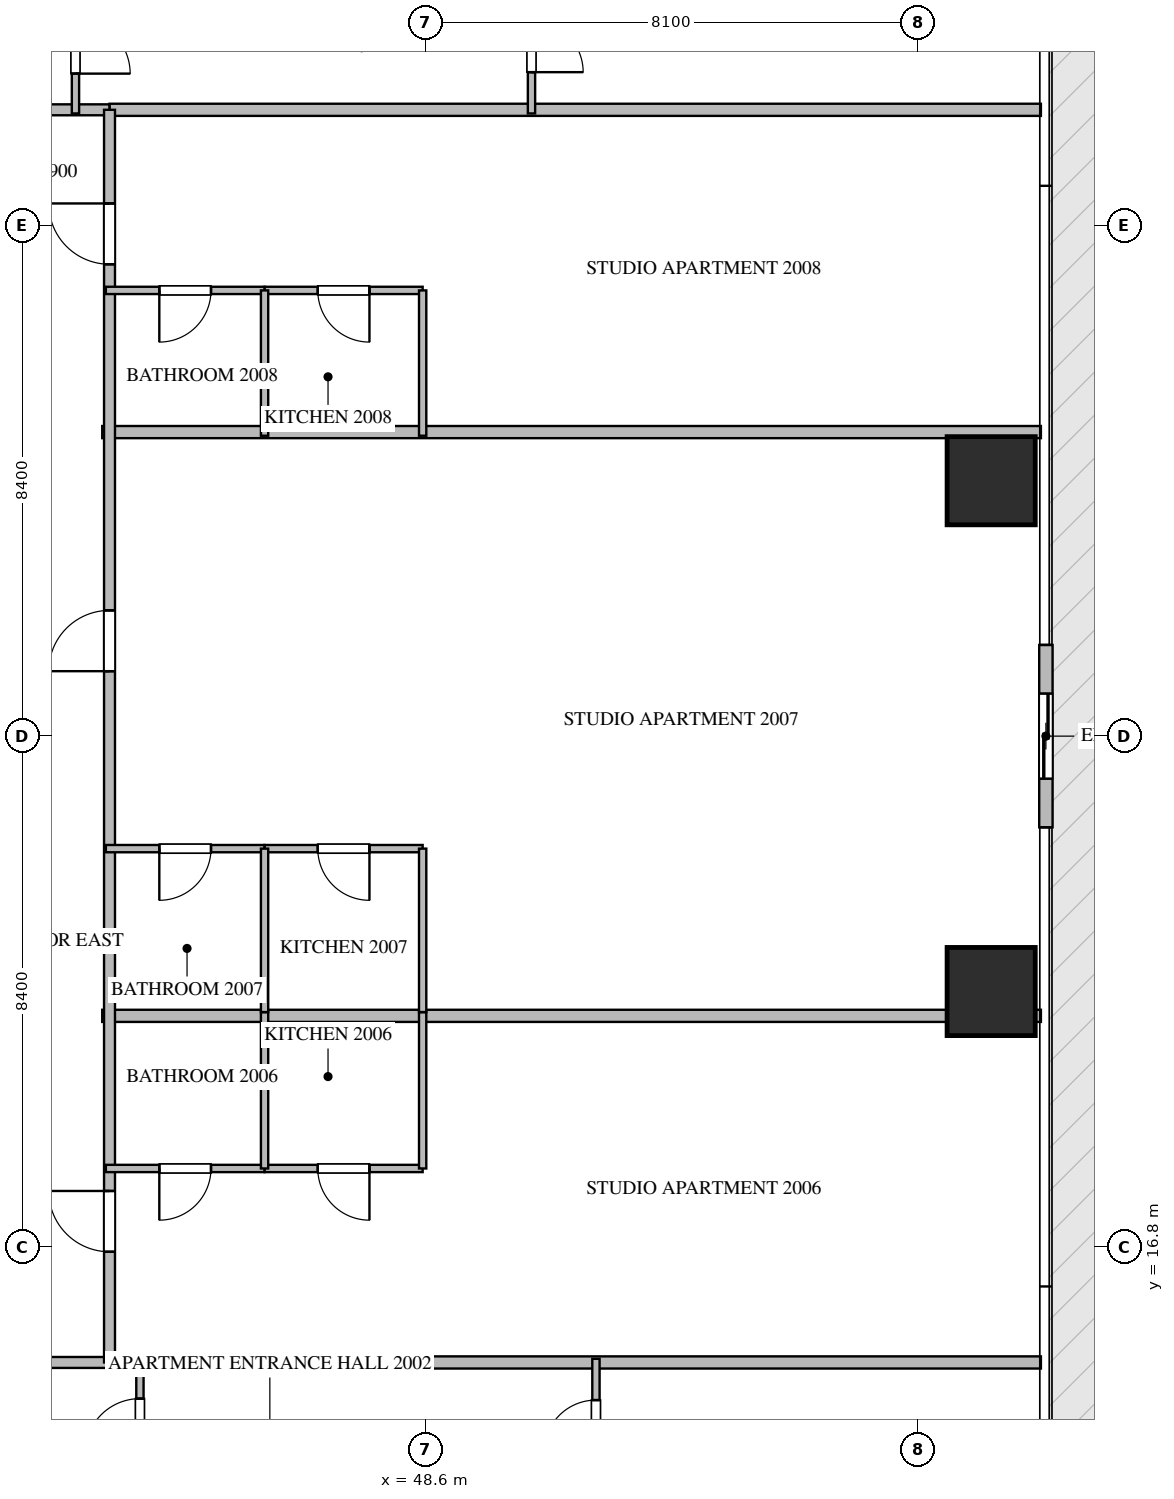
"""IFC4 building model, lengths in metres.
Left out: names, types, materials, properties, quantities, classifications, styles, units other than length and angle.
Written with IfcOpenShell. Run it as: python <this file> out.ifc"""

import sys

from ifc_helpers import new_model, si_unit, direction, frame, frame_2d, origin, origin_2d, place, context, subcontext, project, spatial, rectangle, extrude, source, transform, mapped, element, fill, save


model = new_model("IFC4")
c1 = context("Model", 3, precision=1e-05, world=origin(), true_north=direction((0.0, 1.0)))
c2 = subcontext(c1, "Body", "Model", "MODEL_VIEW")
j1 = project(units=[si_unit("LENGTHUNIT", "METRE"), si_unit("PLANEANGLEUNIT", "RADIAN")], contexts=[c1])
p1 = place(None, origin())
s1 = spatial("IfcSite", under=j1, at=p1, CompositionType="ELEMENT")
p2 = place(p1, origin())
s2 = spatial("IfcBuilding", under=s1, at=p2, CompositionType="ELEMENT")
p3 = place(p2, frame((0.0, 0.0, 82.95)))
s3 = spatial("IfcBuildingStorey", under=s2, at=p3, CompositionType="ELEMENT", Elevation=82.95)
m1 = source(origin(), c2, "Body", "SweptSolid", [
    extrude(rectangle(XDim=1.45, YDim=1.45, at=origin_2d()), origin(), (0.0, 0.0, 1.0), 3.75),
])
for number, where, z_axis, x_axis in (
    (1, (57.9, 21.0, -0.26), (0.0, 0.0, 1.0), (1.0, 0.0, 0.0)),
    (2, (57.9, 29.4, -0.26), (0.0, 0.0, 1.0), (1.0, 0.0, 0.0)),
):
    element("IfcColumn", number, at=place(p3, frame(where, z_axis=z_axis, x_axis=x_axis)), inside=s3, PredefinedType="COLUMN", context=c2, shape_type="MappedRepresentation", body=[
        mapped(m1, transform((0.0, 0.0, 0.0), scale=1.0)),
    ])
p4 = place(p3, frame((58.8, 23.7, 0.0), z_axis=(0.0, 0.0, 1.0), x_axis=(0.0, 1.0, 0.0)))
e3 = element("IfcWall", 3, at=p4, inside=s3, PredefinedType="ELEMENTEDWALL", context=c2, shape_type="SweptSolid", body=[
    extrude(rectangle(XDim=3.0, YDim=0.22, at=frame_2d((1.5, 0.0))), origin(), (0.0, 0.0, 1.0), 3.475),
])
p5 = place(p4, frame((0.8, 0.0, 0.0)))
e4 = element("IfcOpeningElement", 4, at=p5, cuts=e3, PredefinedType="OPENING", context=c2, shape_type="SweptSolid", body=[
    extrude(rectangle(XDim=1.4, YDim=2.25, at=frame_2d((0.7, 1.125))), frame((0.0, 0.12, 0.0), z_axis=(0.0, -1.0, 0.0), x_axis=(1.0, 0.0, 0.0)), (0.0, 0.0, 1.0), 0.24),
])
for number, where, z_axis, x_axis in (
    (5, (43.28, 20.6, 0.0), (0.0, 0.0, 1.0), (1.0, 0.0, 0.0)),
    (6, (43.28, 30.2, 0.0), (0.0, 0.0, 1.0), (1.0, 0.0, 0.0)),
):
    element("IfcWall", number, at=place(p3, frame(where, z_axis=z_axis, x_axis=x_axis)), inside=s3, PredefinedType="PARTITIONING", context=c2, shape_type="SweptSolid", body=[
        extrude(rectangle(XDim=15.438, YDim=0.2, at=frame_2d((7.719, 0.0))), origin(), (0.0, 0.0, 1.0), 3.49),
    ])
for number, where, z_axis, x_axis in (
    (7, (43.4, 14.9, 0.0), (0.0, 0.0, 1.0), (1.0, 0.0, 0.0)),
    (8, (43.4, 35.5, 0.0), (0.0, 0.0, 1.0), (1.0, 0.0, 0.0)),
):
    element("IfcWall", number, at=place(p3, frame(where, z_axis=z_axis, x_axis=x_axis)), inside=s3, PredefinedType="PARTITIONING", context=c2, shape_type="SweptSolid", body=[
        extrude(rectangle(XDim=15.318, YDim=0.2, at=frame_2d((7.659, 0.0))), origin(), (0.0, 0.0, 1.0), 3.49),
    ])
p6 = place(p3, frame((21.402, 14.9, 0.0), z_axis=(0.0, 0.0, 1.0), x_axis=(1.0, 0.0, 0.0)))
e9 = element("IfcWall", 9, at=p6, inside=s3, PredefinedType="PARTITIONING", context=c2, shape_type="SweptSolid", body=[
    extrude(rectangle(XDim=21.996, YDim=0.18, at=frame_2d((10.998, 0.0))), origin(), (0.0, 0.0, 1.0), 3.49),
])
p7 = place(p6, frame((5.774, 0.0, 0.0)))
e10 = element("IfcOpeningElement", 10, at=p7, cuts=e9, PredefinedType="OPENING", context=c2, shape_type="SweptSolid", body=[
    extrude(rectangle(XDim=1.0, YDim=2.15, at=frame_2d((0.5, 1.075))), frame((0.0, 0.1, 0.0), z_axis=(0.0, -1.0, 0.0), x_axis=(1.0, 0.0, 0.0)), (0.0, 0.0, 1.0), 0.2),
])
p8 = place(p6, frame((16.272, 0.0, 0.0)))
e11 = element("IfcOpeningElement", 11, at=p8, cuts=e9, PredefinedType="OPENING", context=c2, shape_type="SweptSolid", body=[
    extrude(rectangle(XDim=1.0, YDim=2.15, at=frame_2d((0.5, 1.075))), frame((0.0, 0.1, 0.0), z_axis=(0.0, -1.0, 0.0), x_axis=(1.0, 0.0, 0.0)), (0.0, 0.0, 1.0), 0.2),
])
p9 = place(p3, frame((21.402, 35.5, 0.0), z_axis=(0.0, 0.0, 1.0), x_axis=(1.0, 0.0, 0.0)))
e12 = element("IfcWall", 12, at=p9, inside=s3, PredefinedType="PARTITIONING", context=c2, shape_type="SweptSolid", body=[
    extrude(rectangle(XDim=21.996, YDim=0.18, at=frame_2d((10.998, 0.0))), origin(), (0.0, 0.0, 1.0), 3.49),
])
p10 = place(p9, frame((4.724, 0.0, 0.0)))
e13 = element("IfcOpeningElement", 13, at=p10, cuts=e12, PredefinedType="OPENING", context=c2, shape_type="SweptSolid", body=[
    extrude(rectangle(XDim=1.0, YDim=2.15, at=frame_2d((0.5, 1.075))), frame((0.0, 0.1, 0.0), z_axis=(0.0, -1.0, 0.0), x_axis=(1.0, 0.0, 0.0)), (0.0, 0.0, 1.0), 0.2),
])
p11 = place(p9, frame((18.77, 0.0, 0.0)))
e14 = element("IfcOpeningElement", 14, at=p11, cuts=e12, PredefinedType="OPENING", context=c2, shape_type="SweptSolid", body=[
    extrude(rectangle(XDim=1.0, YDim=2.15, at=frame_2d((0.5, 1.075))), frame((0.0, 0.1, 0.0), z_axis=(0.0, -1.0, 0.0), x_axis=(1.0, 0.0, 0.0)), (0.0, 0.0, 1.0), 0.2),
])
p12 = place(p3, frame((43.4, 14.9, 0.0), z_axis=(0.0, 0.0, 1.0), x_axis=(0.0, 1.0, 0.0)))
e15 = element("IfcWall", 15, at=p12, inside=s3, PredefinedType="PARTITIONING", context=c2, shape_type="SweptSolid", body=[
    extrude(rectangle(XDim=20.6, YDim=0.18, at=frame_2d((10.3, 0.0))), origin(), (0.0, 0.0, 1.0), 3.49),
])
p13 = place(p12, frame((1.82, 0.0, 0.0)))
e16 = element("IfcOpeningElement", 16, at=p13, cuts=e15, PredefinedType="OPENING", context=c2, shape_type="SweptSolid", body=[
    extrude(rectangle(XDim=1.0, YDim=2.15, at=frame_2d((0.5, 1.075))), frame((0.0, 0.1, 0.0), z_axis=(0.0, -1.0, 0.0), x_axis=(1.0, 0.0, 0.0)), (0.0, 0.0, 1.0), 0.2),
])
p14 = place(p12, frame((11.368, 0.0, 0.0)))
e17 = element("IfcOpeningElement", 17, at=p14, cuts=e15, PredefinedType="OPENING", context=c2, shape_type="SweptSolid", body=[
    extrude(rectangle(XDim=1.0, YDim=2.15, at=frame_2d((0.5, 1.075))), frame((0.0, 0.1, 0.0), z_axis=(0.0, -1.0, 0.0), x_axis=(1.0, 0.0, 0.0)), (0.0, 0.0, 1.0), 0.2),
])
p15 = place(p12, frame((18.06, 0.0, 0.0)))
e18 = element("IfcOpeningElement", 18, at=p15, cuts=e15, PredefinedType="OPENING", context=c2, shape_type="SweptSolid", body=[
    extrude(rectangle(XDim=1.0, YDim=2.15, at=frame_2d((0.5, 1.075))), frame((0.0, 0.1, 0.0), z_axis=(0.0, -1.0, 0.0), x_axis=(1.0, 0.0, 0.0)), (0.0, 0.0, 1.0), 0.2),
])
p16 = place(p3, frame((43.9, 12.75, 0.0), z_axis=(0.0, 0.0, 1.0), x_axis=(0.0, 1.0, 0.0)))
e19 = element("IfcWall", 19, at=p16, inside=s3, PredefinedType="PARTITIONING", context=c2, shape_type="SweptSolid", body=[
    extrude(rectangle(XDim=2.21, YDim=0.12, at=frame_2d((1.105, 0.0))), origin(), (0.0, 0.0, 1.0), 3.49),
])
p17 = place(p16, frame((0.655, 0.0, 0.0)))
e20 = element("IfcOpeningElement", 20, at=p17, cuts=e19, PredefinedType="OPENING", context=c2, shape_type="SweptSolid", body=[
    extrude(rectangle(XDim=0.9, YDim=2.1, at=frame_2d((0.45, 1.05))), frame((0.0, 0.07, 0.0), z_axis=(0.0, -1.0, 0.0), x_axis=(1.0, 0.0, 0.0)), (0.0, 0.0, 1.0), 0.14),
])
p18 = place(p3, frame((51.4, 12.752, 0.0), z_axis=(0.0, 0.0, 1.0), x_axis=(0.0, 1.0, 0.0)))
e21 = element("IfcWall", 21, at=p18, inside=s3, PredefinedType="PARTITIONING", context=c2, shape_type="SweptSolid", body=[
    extrude(rectangle(XDim=2.208, YDim=0.12, at=frame_2d((1.104, 0.0))), origin(), (0.0, 0.0, 1.0), 3.49),
])
p19 = place(p18, frame((0.679, 0.0, 0.0)))
e22 = element("IfcOpeningElement", 22, at=p19, cuts=e21, PredefinedType="OPENING", context=c2, shape_type="SweptSolid", body=[
    extrude(rectangle(XDim=0.85, YDim=2.1, at=frame_2d((0.425, 1.05))), frame((0.0, 0.07, 0.0), z_axis=(0.0, -1.0, 0.0), x_axis=(1.0, 0.0, 0.0)), (0.0, 0.0, 1.0), 0.14),
])
p20 = place(p3, frame((42.84, 37.65, 0.0), z_axis=(0.0, 0.0, 1.0), x_axis=(0.0, -1.0, 0.0)))
e23 = element("IfcWall", 23, at=p20, inside=s3, PredefinedType="PARTITIONING", context=c2, shape_type="SweptSolid", body=[
    extrude(rectangle(XDim=2.21, YDim=0.12, at=frame_2d((1.105, 0.0))), origin(), (0.0, 0.0, 1.0), 3.49),
])
p21 = place(p20, frame((0.655, 0.0, 0.0)))
e24 = element("IfcOpeningElement", 24, at=p21, cuts=e23, PredefinedType="OPENING", context=c2, shape_type="SweptSolid", body=[
    extrude(rectangle(XDim=0.9, YDim=2.1, at=frame_2d((0.45, 1.05))), frame((0.0, 0.07, 0.0), z_axis=(0.0, -1.0, 0.0), x_axis=(1.0, 0.0, 0.0)), (0.0, 0.0, 1.0), 0.14),
])
p22 = place(p3, frame((50.34, 37.648, 0.0), z_axis=(0.0, 0.0, 1.0), x_axis=(0.0, -1.0, 0.0)))
e25 = element("IfcWall", 25, at=p22, inside=s3, PredefinedType="PARTITIONING", context=c2, shape_type="SweptSolid", body=[
    extrude(rectangle(XDim=2.208, YDim=0.12, at=frame_2d((1.104, 0.0))), origin(), (0.0, 0.0, 1.0), 3.49),
])
p23 = place(p22, frame((0.679, 0.0, 0.0)))
e26 = element("IfcOpeningElement", 26, at=p23, cuts=e25, PredefinedType="OPENING", context=c2, shape_type="SweptSolid", body=[
    extrude(rectangle(XDim=0.85, YDim=2.1, at=frame_2d((0.425, 1.05))), frame((0.0, 0.07, 0.0), z_axis=(0.0, -1.0, 0.0), x_axis=(1.0, 0.0, 0.0)), (0.0, 0.0, 1.0), 0.14),
])
p24 = place(p3, frame((48.55, 18.09, 0.0), z_axis=(0.0, 0.0, 1.0), x_axis=(-1.0, 0.0, 0.0)))
e27 = element("IfcWall", 27, at=p24, inside=s3, PredefinedType="PARTITIONING", context=c2, shape_type="SweptSolid", body=[
    extrude(rectangle(XDim=2.6, YDim=0.12, at=frame_2d((1.3, 0.0))), origin(), (0.0, 0.0, 1.0), 3.49),
])
p25 = place(p24, frame((0.875, 0.0, 0.0)))
e28 = element("IfcOpeningElement", 28, at=p25, cuts=e27, PredefinedType="OPENING", context=c2, shape_type="SweptSolid", body=[
    extrude(rectangle(XDim=0.85, YDim=2.1, at=frame_2d((0.425, 1.05))), frame((0.0, 0.07, 0.0), z_axis=(0.0, -1.0, 0.0), x_axis=(1.0, 0.0, 0.0)), (0.0, 0.0, 1.0), 0.14),
])
p26 = place(p3, frame((45.948, 18.09, 0.0), z_axis=(0.0, 0.0, 1.0), x_axis=(-1.0, 0.0, 0.0)))
e29 = element("IfcWall", 29, at=p26, inside=s3, PredefinedType="PARTITIONING", context=c2, shape_type="SweptSolid", body=[
    extrude(rectangle(XDim=2.608, YDim=0.12, at=frame_2d((1.304, 0.0))), origin(), (0.0, 0.0, 1.0), 3.49),
])
p27 = place(p26, frame((0.879, 0.0, 0.0)))
e30 = element("IfcOpeningElement", 30, at=p27, cuts=e29, PredefinedType="OPENING", context=c2, shape_type="SweptSolid", body=[
    extrude(rectangle(XDim=0.85, YDim=2.1, at=frame_2d((0.425, 1.05))), frame((0.0, 0.07, 0.0), z_axis=(0.0, -1.0, 0.0), x_axis=(1.0, 0.0, 0.0)), (0.0, 0.0, 1.0), 0.14),
])
for number, where, z_axis, x_axis in (
    (31, (45.95, 18.09, 0.0), (0.0, 0.0, 1.0), (0.0, 1.0, 0.0)),
    (32, (48.55, 18.09, 0.0), (0.0, 0.0, 1.0), (0.0, 1.0, 0.0)),
):
    element("IfcWall", number, at=place(p3, frame(where, z_axis=z_axis, x_axis=x_axis)), inside=s3, PredefinedType="PARTITIONING", context=c2, shape_type="SweptSolid", body=[
        extrude(rectangle(XDim=2.57, YDim=0.12, at=frame_2d((1.285, 0.0))), origin(), (0.0, 0.0, 1.0), 3.49),
    ])
p28 = place(p3, frame((48.55, 23.35, 0.0), z_axis=(0.0, 0.0, 1.0), x_axis=(-1.0, 0.0, 0.0)))
e33 = element("IfcWall", 33, at=p28, inside=s3, PredefinedType="PARTITIONING", context=c2, shape_type="SweptSolid", body=[
    extrude(rectangle(XDim=2.6, YDim=0.12, at=frame_2d((1.3, 0.0))), origin(), (0.0, 0.0, 1.0), 3.49),
])
p29 = place(p28, frame((0.875, 0.0, 0.0)))
e34 = element("IfcOpeningElement", 34, at=p29, cuts=e33, PredefinedType="OPENING", context=c2, shape_type="SweptSolid", body=[
    extrude(rectangle(XDim=0.85, YDim=2.1, at=frame_2d((0.425, 1.05))), frame((0.0, 0.07, 0.0), z_axis=(0.0, -1.0, 0.0), x_axis=(1.0, 0.0, 0.0)), (0.0, 0.0, 1.0), 0.14),
])
p30 = place(p3, frame((45.948, 23.35, 0.0), z_axis=(0.0, 0.0, 1.0), x_axis=(-1.0, 0.0, 0.0)))
e35 = element("IfcWall", 35, at=p30, inside=s3, PredefinedType="PARTITIONING", context=c2, shape_type="SweptSolid", body=[
    extrude(rectangle(XDim=2.608, YDim=0.12, at=frame_2d((1.304, 0.0))), origin(), (0.0, 0.0, 1.0), 3.49),
])
p31 = place(p30, frame((0.879, 0.0, 0.0)))
e36 = element("IfcOpeningElement", 36, at=p31, cuts=e35, PredefinedType="OPENING", context=c2, shape_type="SweptSolid", body=[
    extrude(rectangle(XDim=0.85, YDim=2.1, at=frame_2d((0.425, 1.05))), frame((0.0, 0.07, 0.0), z_axis=(0.0, -1.0, 0.0), x_axis=(1.0, 0.0, 0.0)), (0.0, 0.0, 1.0), 0.14),
])
for number, where, z_axis, x_axis in (
    (37, (45.95, 20.662, 0.0), (0.0, 0.0, 1.0), (0.0, 1.0, 0.0)),
    (38, (48.55, 20.662, 0.0), (0.0, 0.0, 1.0), (0.0, 1.0, 0.0)),
):
    element("IfcWall", number, at=place(p3, frame(where, z_axis=z_axis, x_axis=x_axis)), inside=s3, PredefinedType="PARTITIONING", context=c2, shape_type="SweptSolid", body=[
        extrude(rectangle(XDim=2.688, YDim=0.12, at=frame_2d((1.344, 0.0))), origin(), (0.0, 0.0, 1.0), 3.49),
    ])
p32 = place(p3, frame((48.55, 32.53, 0.0), z_axis=(0.0, 0.0, 1.0), x_axis=(-1.0, 0.0, 0.0)))
e39 = element("IfcWall", 39, at=p32, inside=s3, PredefinedType="PARTITIONING", context=c2, shape_type="SweptSolid", body=[
    extrude(rectangle(XDim=2.6, YDim=0.12, at=frame_2d((1.3, 0.0))), origin(), (0.0, 0.0, 1.0), 3.49),
])
p33 = place(p32, frame((0.875, 0.0, 0.0)))
e40 = element("IfcOpeningElement", 40, at=p33, cuts=e39, PredefinedType="OPENING", context=c2, shape_type="SweptSolid", body=[
    extrude(rectangle(XDim=0.85, YDim=2.1, at=frame_2d((0.425, 1.05))), frame((0.0, 0.07, 0.0), z_axis=(0.0, -1.0, 0.0), x_axis=(1.0, 0.0, 0.0)), (0.0, 0.0, 1.0), 0.14),
])
p34 = place(p3, frame((45.948, 32.53, 0.0), z_axis=(0.0, 0.0, 1.0), x_axis=(-1.0, 0.0, 0.0)))
e41 = element("IfcWall", 41, at=p34, inside=s3, PredefinedType="PARTITIONING", context=c2, shape_type="SweptSolid", body=[
    extrude(rectangle(XDim=2.608, YDim=0.12, at=frame_2d((1.304, 0.0))), origin(), (0.0, 0.0, 1.0), 3.49),
])
p35 = place(p34, frame((0.879, 0.0, 0.0)))
e42 = element("IfcOpeningElement", 42, at=p35, cuts=e41, PredefinedType="OPENING", context=c2, shape_type="SweptSolid", body=[
    extrude(rectangle(XDim=0.85, YDim=2.1, at=frame_2d((0.425, 1.05))), frame((0.0, 0.07, 0.0), z_axis=(0.0, -1.0, 0.0), x_axis=(1.0, 0.0, 0.0)), (0.0, 0.0, 1.0), 0.14),
])
for number, where, z_axis, x_axis in (
    (43, (45.95, 30.14, 0.0), (0.0, 0.0, 1.0), (0.0, 1.0, 0.0)),
    (44, (48.55, 30.14, 0.0), (0.0, 0.0, 1.0), (0.0, 1.0, 0.0)),
):
    element("IfcWall", number, at=place(p3, frame(where, z_axis=z_axis, x_axis=x_axis)), inside=s3, PredefinedType="PARTITIONING", context=c2, shape_type="SweptSolid", body=[
        extrude(rectangle(XDim=2.39, YDim=0.12, at=frame_2d((1.195, 0.0))), origin(), (0.0, 0.0, 1.0), 3.49),
    ])
m2 = source(origin(), c2, "Body", "SweptSolid", [
    extrude(rectangle(XDim=1.4, YDim=2.25, at=frame_2d((0.7, 1.125))), frame((0.0, 0.025, 0.0), z_axis=(0.0, -1.0, 0.0), x_axis=(1.0, 0.0, 0.0)), (0.0, 0.0, 1.0), 0.05),
])
p36 = place(p5, origin())
e45 = element("IfcDoor", 45, at=p36, inside=s3, OperationType="SLIDING_TO_LEFT", PredefinedType="DOOR", context=c2, shape_type="MappedRepresentation", body=[
    mapped(m2, transform((0.0, 0.0, 0.0), scale=1.0)),
])
fill(e4, e45)
m3 = source(origin(), c2, "Body", "SweptSolid", [
    extrude(rectangle(XDim=1.0, YDim=2.15, at=frame_2d((0.5, 1.075))), frame((0.0, 0.025, 0.0), z_axis=(0.0, -1.0, 0.0), x_axis=(1.0, 0.0, 0.0)), (0.0, 0.0, 1.0), 0.05),
])
p37 = place(p13, origin())
e46 = element("IfcDoor", 46, at=p37, inside=s3, OperationType="SINGLE_SWING_RIGHT", PredefinedType="DOOR", context=c2, shape_type="MappedRepresentation", body=[
    mapped(m3, transform((0.0, 0.0, 0.0), scale=1.0)),
])
fill(e16, e46)
p38 = place(p14, origin())
e47 = element("IfcDoor", 47, at=p38, inside=s3, OperationType="SINGLE_SWING_LEFT", PredefinedType="DOOR", context=c2, shape_type="MappedRepresentation", body=[
    mapped(m3, transform((0.0, 0.0, 0.0), scale=1.0)),
])
fill(e17, e47)
p39 = place(p15, origin())
e48 = element("IfcDoor", 48, at=p39, inside=s3, OperationType="SINGLE_SWING_RIGHT", PredefinedType="DOOR", context=c2, shape_type="MappedRepresentation", body=[
    mapped(m3, transform((0.0, 0.0, 0.0), scale=1.0)),
])
fill(e18, e48)
m4 = source(origin(), c2, "Body", "SweptSolid", [
    extrude(rectangle(XDim=0.9, YDim=2.1, at=frame_2d((0.45, 1.05))), frame((0.0, 0.025, 0.0), z_axis=(0.0, -1.0, 0.0), x_axis=(1.0, 0.0, 0.0)), (0.0, 0.0, 1.0), 0.05),
])
p40 = place(p17, origin())
e49 = element("IfcDoor", 49, at=p40, inside=s3, OperationType="SINGLE_SWING_LEFT", PredefinedType="DOOR", context=c2, shape_type="MappedRepresentation", body=[
    mapped(m4, transform((0.0, 0.0, 0.0), scale=1.0)),
])
fill(e20, e49)
m5 = source(origin(), c2, "Body", "SweptSolid", [
    extrude(rectangle(XDim=0.85, YDim=2.1, at=frame_2d((0.425, 1.05))), frame((0.0, 0.025, 0.0), z_axis=(0.0, -1.0, 0.0), x_axis=(1.0, 0.0, 0.0)), (0.0, 0.0, 1.0), 0.05),
])
p41 = place(p19, origin())
e50 = element("IfcDoor", 50, at=p41, inside=s3, OperationType="SINGLE_SWING_LEFT", PredefinedType="DOOR", context=c2, shape_type="MappedRepresentation", body=[
    mapped(m5, transform((0.0, 0.0, 0.0), scale=1.0)),
])
fill(e22, e50)
p42 = place(p21, origin())
e51 = element("IfcDoor", 51, at=p42, inside=s3, OperationType="SINGLE_SWING_RIGHT", PredefinedType="DOOR", context=c2, shape_type="MappedRepresentation", body=[
    mapped(m4, transform((0.0, 0.0, 0.0), scale=1.0)),
])
fill(e24, e51)
p43 = place(p23, origin())
e52 = element("IfcDoor", 52, at=p43, inside=s3, OperationType="SINGLE_SWING_RIGHT", PredefinedType="DOOR", context=c2, shape_type="MappedRepresentation", body=[
    mapped(m5, transform((0.0, 0.0, 0.0), scale=1.0)),
])
fill(e26, e52)
p44 = place(p25, origin())
e53 = element("IfcDoor", 53, at=p44, inside=s3, OperationType="SINGLE_SWING_LEFT", PredefinedType="DOOR", context=c2, shape_type="MappedRepresentation", body=[
    mapped(m5, transform((0.0, 0.0, 0.0), scale=1.0)),
])
fill(e28, e53)
p45 = place(p27, origin())
e54 = element("IfcDoor", 54, at=p45, inside=s3, OperationType="SINGLE_SWING_RIGHT", PredefinedType="DOOR", context=c2, shape_type="MappedRepresentation", body=[
    mapped(m5, transform((0.0, 0.0, 0.0), scale=1.0)),
])
fill(e30, e54)
p46 = place(p29, origin())
e55 = element("IfcDoor", 55, at=p46, inside=s3, OperationType="SINGLE_SWING_LEFT", PredefinedType="DOOR", context=c2, shape_type="MappedRepresentation", body=[
    mapped(m5, transform((0.0, 0.0, 0.0), scale=1.0)),
])
fill(e34, e55)
p47 = place(p31, origin())
e56 = element("IfcDoor", 56, at=p47, inside=s3, OperationType="SINGLE_SWING_RIGHT", PredefinedType="DOOR", context=c2, shape_type="MappedRepresentation", body=[
    mapped(m5, transform((0.0, 0.0, 0.0), scale=1.0)),
])
fill(e36, e56)
p48 = place(p33, origin())
e57 = element("IfcDoor", 57, at=p48, inside=s3, OperationType="SINGLE_SWING_LEFT", PredefinedType="DOOR", context=c2, shape_type="MappedRepresentation", body=[
    mapped(m5, transform((0.0, 0.0, 0.0), scale=1.0)),
])
fill(e40, e57)
p49 = place(p35, origin())
e58 = element("IfcDoor", 58, at=p49, inside=s3, OperationType="SINGLE_SWING_RIGHT", PredefinedType="DOOR", context=c2, shape_type="MappedRepresentation", body=[
    mapped(m5, transform((0.0, 0.0, 0.0), scale=1.0)),
])
fill(e42, e58)
save(model, sys.argv[1])
